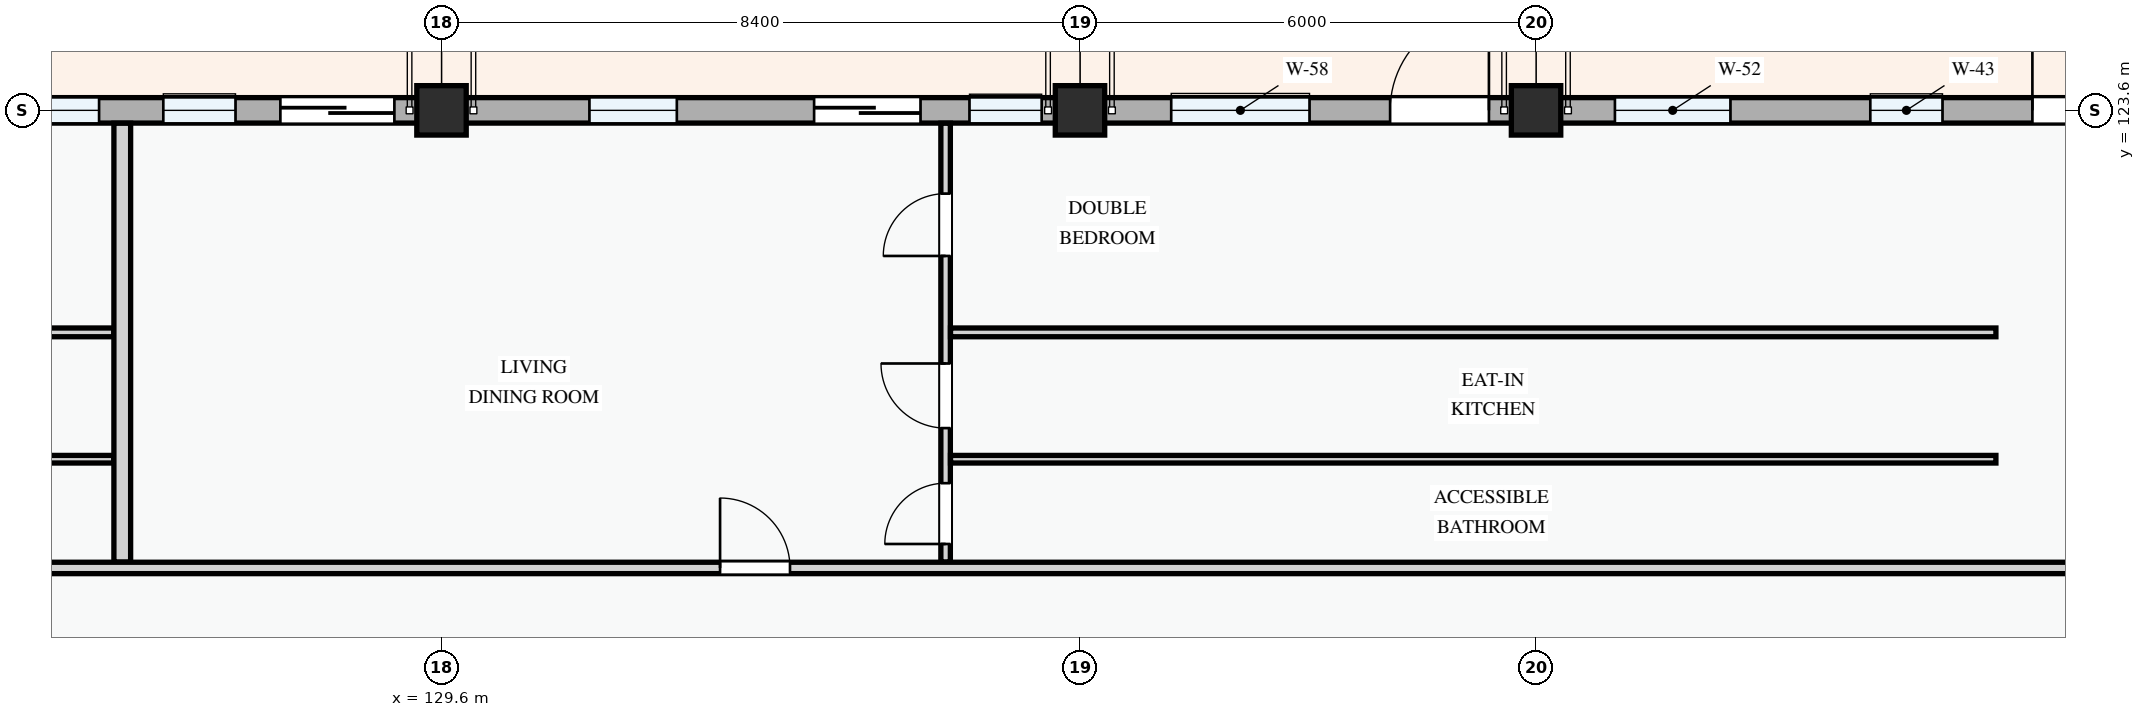
"""IFC4 building model, lengths in metres.
Left out: names, types, materials, properties, quantities, classifications, styles, units other than length and angle.
Written with IfcOpenShell. Run it as: python <this file> out.ifc"""

import sys

from ifc_helpers import new_model, si_unit, direction, frame, frame_2d, origin, origin_2d, place, context, subcontext, project, spatial, rectangle, extrude, element, fill, save


model = new_model("IFC4")
c1 = context("Model", 3, precision=1e-05, world=origin(), true_north=direction((0.0, 1.0)))
c2 = subcontext(c1, "Body", "Model", "MODEL_VIEW")
j1 = project(units=[si_unit("LENGTHUNIT", "METRE"), si_unit("PLANEANGLEUNIT", "RADIAN")], contexts=[c1])
p1 = place(None, origin())
s1 = spatial("IfcSite", under=j1, at=p1, CompositionType="ELEMENT")
p2 = place(p1, origin())
s2 = spatial("IfcBuilding", under=s1, at=p2, CompositionType="ELEMENT")
p3 = place(p2, frame((0.0, 0.0, 14.7)))
s3 = spatial("IfcBuildingStorey", under=s2, at=p3, CompositionType="ELEMENT", Elevation=14.7)
for number, where, z_axis, x_axis in (
    (1, (129.6, 123.6, 0.0), (0.0, 0.0, 1.0), (1.0, 0.0, 0.0)),
    (2, (138.0, 123.6, 0.0), (0.0, 0.0, 1.0), (1.0, 0.0, 0.0)),
    (3, (144.0, 123.6, 0.0), (0.0, 0.0, 1.0), (1.0, 0.0, 0.0)),
):
    element("IfcColumn", number, at=place(p3, frame(where, z_axis=z_axis, x_axis=x_axis)), inside=s3, PredefinedType="COLUMN", context=c2, shape_type="SweptSolid", body=[
        extrude(rectangle(XDim=0.65, YDim=0.65, at=origin_2d()), origin(), (0.0, 0.0, 1.0), 3.3),
    ])
p4 = place(p3, frame((152.4, 123.6, 0.0), z_axis=(0.0, 0.0, 1.0), x_axis=(-1.0, 0.0, 0.0)))
e4 = element("IfcWall", 4, at=p4, inside=s3, PredefinedType="STANDARD", context=c2, shape_type="SweptSolid", body=[
    extrude(rectangle(XDim=8.4, YDim=0.335, at=frame_2d((4.2, 0.0))), origin(), (0.0, 0.0, 1.0), 2.345),
])
p5 = place(p4, frame((0.62, 0.0, 0.0)))
e5 = element("IfcOpeningElement", 5, at=p5, cuts=e4, PredefinedType="OPENING", context=c2, shape_type="SweptSolid", body=[
    extrude(rectangle(XDim=1.25, YDim=2.2, at=frame_2d((0.625, 1.1))), frame((0.0, 0.177, 0.0), z_axis=(0.0, -1.0, 0.0), x_axis=(1.0, 0.0, 0.0)), (0.0, 0.0, 1.0), 0.355),
])
p6 = place(p4, frame((3.052, 0.0, 0.78)))
e6 = element("IfcOpeningElement", 6, at=p6, cuts=e4, PredefinedType="OPENING", context=c2, shape_type="SweptSolid", body=[
    extrude(rectangle(XDim=0.95, YDim=1.15, at=frame_2d((0.475, 0.575))), frame((0.0, 0.177, 0.0), z_axis=(0.0, -1.0, 0.0), x_axis=(1.0, 0.0, 0.0)), (0.0, 0.0, 1.0), 0.355),
])
p7 = place(p4, frame((5.843, 0.0, 0.78)))
e7 = element("IfcOpeningElement", 7, at=p7, cuts=e4, PredefinedType="OPENING", context=c2, shape_type="SweptSolid", body=[
    extrude(rectangle(XDim=1.52, YDim=1.42, at=frame_2d((0.76, 0.71))), frame((0.0, 0.177, 0.0), z_axis=(0.0, -1.0, 0.0), x_axis=(1.0, 0.0, 0.0)), (0.0, 0.0, 1.0), 0.355),
])
p8 = place(p3, frame((144.0, 123.6, 0.0), z_axis=(0.0, 0.0, 1.0), x_axis=(-1.0, 0.0, 0.0)))
e8 = element("IfcWall", 8, at=p8, inside=s3, PredefinedType="STANDARD", context=c2, shape_type="SweptSolid", body=[
    extrude(rectangle(XDim=6.0, YDim=0.335, at=frame_2d((3.0, 0.0))), origin(), (0.0, 0.0, 1.0), 2.445),
])
p9 = place(p8, frame((0.62, 0.0, 0.0)))
e9 = element("IfcOpeningElement", 9, at=p9, cuts=e8, PredefinedType="OPENING", context=c2, shape_type="SweptSolid", body=[
    extrude(rectangle(XDim=1.3, YDim=2.15, at=frame_2d((0.65, 1.075))), frame((0.0, 0.177, 0.0), z_axis=(0.0, -1.0, 0.0), x_axis=(1.0, 0.0, 0.0)), (0.0, 0.0, 1.0), 0.355),
])
p10 = place(p8, frame((2.98, 0.0, 0.78)))
e10 = element("IfcOpeningElement", 10, at=p10, cuts=e8, PredefinedType="OPENING", context=c2, shape_type="SweptSolid", body=[
    extrude(rectangle(XDim=1.82, YDim=1.46, at=frame_2d((0.91, 0.73))), frame((0.0, 0.177, 0.0), z_axis=(0.0, -1.0, 0.0), x_axis=(1.0, 0.0, 0.0)), (0.0, 0.0, 1.0), 0.355),
])
p11 = place(p3, frame((138.0, 123.6, 0.0), z_axis=(0.0, 0.0, 1.0), x_axis=(-1.0, 0.0, 0.0)))
e11 = element("IfcWall", 11, at=p11, inside=s3, PredefinedType="STANDARD", context=c2, shape_type="SweptSolid", body=[
    extrude(rectangle(XDim=8.4, YDim=0.335, at=frame_2d((4.2, 0.0))), origin(), (0.0, 0.0, 1.0), 2.345),
])
p12 = place(p11, frame((2.098, 0.0, 0.0)))
e12 = element("IfcOpeningElement", 12, at=p12, cuts=e11, PredefinedType="OPENING", context=c2, shape_type="SweptSolid", body=[
    extrude(rectangle(XDim=1.4, YDim=2.2, at=frame_2d((0.7, 1.1))), frame((0.0, 0.177, 0.0), z_axis=(0.0, -1.0, 0.0), x_axis=(1.0, 0.0, 0.0)), (0.0, 0.0, 1.0), 0.355),
])
p13 = place(p11, frame((0.504, 0.0, 0.78)))
e13 = element("IfcOpeningElement", 13, at=p13, cuts=e11, PredefinedType="OPENING", context=c2, shape_type="SweptSolid", body=[
    extrude(rectangle(XDim=0.95, YDim=1.15, at=frame_2d((0.475, 0.575))), frame((0.0, 0.177, 0.0), z_axis=(0.0, -1.0, 0.0), x_axis=(1.0, 0.0, 0.0)), (0.0, 0.0, 1.0), 0.355),
])
p14 = place(p11, frame((5.304, 0.0, 0.78)))
e14 = element("IfcOpeningElement", 14, at=p14, cuts=e11, PredefinedType="OPENING", context=c2, shape_type="SweptSolid", body=[
    extrude(rectangle(XDim=1.15, YDim=1.25, at=frame_2d((0.575, 0.625))), frame((0.0, 0.177, 0.0), z_axis=(0.0, -1.0, 0.0), x_axis=(1.0, 0.0, 0.0)), (0.0, 0.0, 1.0), 0.355),
])
p15 = place(p3, frame((129.6, 123.6, 0.0), z_axis=(0.0, 0.0, 1.0), x_axis=(-1.0, 0.0, 0.0)))
e15 = element("IfcWall", 15, at=p15, inside=s3, PredefinedType="STANDARD", context=c2, shape_type="SweptSolid", body=[
    extrude(rectangle(XDim=6.0, YDim=0.335, at=frame_2d((3.0, 0.0))), origin(), (0.0, 0.0, 1.0), 2.445),
])
p16 = place(p15, frame((0.62, 0.0, 0.0)))
e16 = element("IfcOpeningElement", 16, at=p16, cuts=e15, PredefinedType="OPENING", context=c2, shape_type="SweptSolid", body=[
    extrude(rectangle(XDim=1.5, YDim=2.2, at=frame_2d((0.75, 1.1))), frame((0.0, 0.177, 0.0), z_axis=(0.0, -1.0, 0.0), x_axis=(1.0, 0.0, 0.0)), (0.0, 0.0, 1.0), 0.355),
])
p17 = place(p15, frame((2.71, 0.0, 0.78)))
e17 = element("IfcOpeningElement", 17, at=p17, cuts=e15, PredefinedType="OPENING", context=c2, shape_type="SweptSolid", body=[
    extrude(rectangle(XDim=0.95, YDim=1.15, at=frame_2d((0.475, 0.575))), frame((0.0, 0.177, 0.0), z_axis=(0.0, -1.0, 0.0), x_axis=(1.0, 0.0, 0.0)), (0.0, 0.0, 1.0), 0.355),
])
p18 = place(p15, frame((4.505, 0.0, 0.78)))
e18 = element("IfcOpeningElement", 18, at=p18, cuts=e15, PredefinedType="OPENING", context=c2, shape_type="SweptSolid", body=[
    extrude(rectangle(XDim=1.0, YDim=1.25, at=frame_2d((0.5, 0.625))), frame((0.0, 0.177, 0.0), z_axis=(0.0, -1.0, 0.0), x_axis=(1.0, 0.0, 0.0)), (0.0, 0.0, 1.0), 0.355),
])
p19 = place(p3, frame((113.477, 120.679, 0.0), z_axis=(0.0, 0.0, 1.0), x_axis=(1.0, 0.0, 0.0)))
e19 = element("IfcWall", 19, at=p19, inside=s3, PredefinedType="PARTITIONING", context=c2, shape_type="SweptSolid", body=[
    extrude(rectangle(XDim=11.811, YDim=0.115, at=frame_2d((5.905, 0.0))), origin(), (0.0, 0.0, 1.0), 3.0),
])
p20 = place(p3, frame((113.477, 119.01, 0.0), z_axis=(0.0, 0.0, 1.0), x_axis=(1.0, 0.0, 0.0)))
e20 = element("IfcWall", 20, at=p20, inside=s3, PredefinedType="PARTITIONING", context=c2, shape_type="SweptSolid", body=[
    extrude(rectangle(XDim=11.811, YDim=0.1, at=frame_2d((5.905, 0.0))), origin(), (0.0, 0.0, 1.0), 3.0),
])
p21 = place(p3, frame((136.232, 117.657, 0.0), z_axis=(0.0, 0.0, 1.0), x_axis=(0.0, 1.0, 0.0)))
e21 = element("IfcWall", 21, at=p21, inside=s3, PredefinedType="PARTITIONING", context=c2, shape_type="SweptSolid", body=[
    extrude(rectangle(XDim=5.773, YDim=0.125, at=frame_2d((2.887, 0.0))), origin(), (0.0, 0.0, 1.0), 3.0),
])
p22 = place(p21, frame((0.238, 0.0, 0.0)))
e22 = element("IfcOpeningElement", 22, at=p22, cuts=e21, PredefinedType="OPENING", context=c2, shape_type="SweptSolid", body=[
    extrude(rectangle(XDim=0.8, YDim=2.1, at=frame_2d((0.4, 1.05))), frame((0.0, 0.073, 0.0), z_axis=(0.0, -1.0, 0.0), x_axis=(1.0, 0.0, 0.0)), (0.0, 0.0, 1.0), 0.145),
])
p23 = place(p21, frame((1.763, 0.0, 0.0)))
e23 = element("IfcOpeningElement", 23, at=p23, cuts=e21, PredefinedType="OPENING", context=c2, shape_type="SweptSolid", body=[
    extrude(rectangle(XDim=0.85, YDim=2.1, at=frame_2d((0.425, 1.05))), frame((0.0, 0.073, 0.0), z_axis=(0.0, -1.0, 0.0), x_axis=(1.0, 0.0, 0.0)), (0.0, 0.0, 1.0), 0.145),
])
p24 = place(p21, frame((4.028, 0.0, 0.0)))
e24 = element("IfcOpeningElement", 24, at=p24, cuts=e21, PredefinedType="OPENING", context=c2, shape_type="SweptSolid", body=[
    extrude(rectangle(XDim=0.82, YDim=2.08, at=frame_2d((0.41, 1.04))), frame((0.0, 0.073, 0.0), z_axis=(0.0, -1.0, 0.0), x_axis=(1.0, 0.0, 0.0)), (0.0, 0.0, 1.0), 0.145),
])
p25 = place(p3, frame((136.296, 120.679, 0.0), z_axis=(0.0, 0.0, 1.0), x_axis=(1.0, 0.0, 0.0)))
e25 = element("IfcWall", 25, at=p25, inside=s3, PredefinedType="PARTITIONING", context=c2, shape_type="SweptSolid", body=[
    extrude(rectangle(XDim=13.754, YDim=0.115, at=frame_2d((6.877, 0.0))), origin(), (0.0, 0.0, 1.0), 3.0),
])
p26 = place(p3, frame((136.296, 119.01, 0.0), z_axis=(0.0, 0.0, 1.0), x_axis=(1.0, 0.0, 0.0)))
e26 = element("IfcWall", 26, at=p26, inside=s3, PredefinedType="PARTITIONING", context=c2, shape_type="SweptSolid", body=[
    extrude(rectangle(XDim=13.754, YDim=0.1, at=frame_2d((6.877, 0.0))), origin(), (0.0, 0.0, 1.0), 3.0),
])
p27 = place(p3, frame((125.4, 117.657, 0.0), z_axis=(0.0, 0.0, 1.0), x_axis=(0.0, 1.0, 0.0)))
e27 = element("IfcWall", 27, at=p27, inside=s3, PredefinedType="PARTITIONING", context=c2, shape_type="SweptSolid", body=[
    extrude(rectangle(XDim=5.773, YDim=0.22, at=frame_2d((2.887, 0.0))), origin(), (0.0, 0.0, 1.0), 3.0),
])
p28 = place(p3, frame((80.57, 117.58, 0.0), z_axis=(0.0, 0.0, 1.0), x_axis=(1.0, 0.0, 0.0)))
e28 = element("IfcWall", 28, at=p28, inside=s3, PredefinedType="PARTITIONING", context=c2, shape_type="SweptSolid", body=[
    extrude(rectangle(XDim=71.97, YDim=0.15, at=frame_2d((35.985, 0.0))), origin(), (0.0, 0.0, 1.0), 3.0),
])
p29 = place(p28, frame((9.279, 0.0, 0.0)))
e29 = element("IfcOpeningElement", 29, at=p29, cuts=e28, PredefinedType="OPENING", context=c2, shape_type="SweptSolid", body=[
    extrude(rectangle(XDim=0.92, YDim=2.1, at=frame_2d((0.46, 1.05))), frame((0.0, 0.085, 0.0), z_axis=(0.0, -1.0, 0.0), x_axis=(1.0, 0.0, 0.0)), (0.0, 0.0, 1.0), 0.17),
])
p30 = place(p28, frame((23.985, 0.0, 0.0)))
e30 = element("IfcOpeningElement", 30, at=p30, cuts=e28, PredefinedType="OPENING", context=c2, shape_type="SweptSolid", body=[
    extrude(rectangle(XDim=0.96, YDim=2.12, at=frame_2d((0.48, 1.06))), frame((0.0, 0.085, 0.0), z_axis=(0.0, -1.0, 0.0), x_axis=(1.0, 0.0, 0.0)), (0.0, 0.0, 1.0), 0.17),
])
p31 = place(p28, frame((52.695, 0.0, 0.0)))
e31 = element("IfcOpeningElement", 31, at=p31, cuts=e28, PredefinedType="OPENING", context=c2, shape_type="SweptSolid", body=[
    extrude(rectangle(XDim=0.92, YDim=2.1, at=frame_2d((0.46, 1.05))), frame((0.0, 0.085, 0.0), z_axis=(0.0, -1.0, 0.0), x_axis=(1.0, 0.0, 0.0)), (0.0, 0.0, 1.0), 0.17),
])
p32 = place(p5, frame((1.25, 0.0, 0.0), z_axis=(0.0, 0.0, 1.0), x_axis=(-1.0, 0.0, 0.0)))
e32 = element("IfcDoor", 32, at=p32, inside=s3, OperationType="SINGLE_SWING_LEFT", PredefinedType="DOOR", context=c2, shape_type="SweptSolid", body=[
    extrude(rectangle(XDim=1.25, YDim=2.2, at=frame_2d((0.625, 1.1))), frame((0.0, 0.025, 0.0), z_axis=(0.0, -1.0, 0.0), x_axis=(1.0, 0.0, 0.0)), (0.0, 0.0, 1.0), 0.05),
])
fill(e5, e32)
p33 = place(p6, origin())
e33 = element("IfcWindow", 33, at=p33, inside=s3, PartitioningType="SINGLE_PANEL", PredefinedType="WINDOW", context=c2, shape_type="SweptSolid", body=[
    extrude(rectangle(XDim=0.95, YDim=1.15, at=frame_2d((0.475, 0.575))), frame((0.0, 0.03, 0.0), z_axis=(0.0, -1.0, 0.0), x_axis=(1.0, 0.0, 0.0)), (0.0, 0.0, 1.0), 0.06),
])
fill(e6, e33)
p34 = place(p7, origin())
e34 = element("IfcWindow", 34, at=p34, inside=s3, PartitioningType="SINGLE_PANEL", PredefinedType="WINDOW", context=c2, shape_type="SweptSolid", body=[
    extrude(rectangle(XDim=1.52, YDim=1.42, at=frame_2d((0.76, 0.71))), frame((0.0, 0.03, 0.0), z_axis=(0.0, -1.0, 0.0), x_axis=(1.0, 0.0, 0.0)), (0.0, 0.0, 1.0), 0.06),
])
fill(e7, e34)
p35 = place(p9, frame((1.3, 0.0, 0.0), z_axis=(0.0, 0.0, 1.0), x_axis=(-1.0, 0.0, 0.0)))
e35 = element("IfcDoor", 35, at=p35, inside=s3, OperationType="SINGLE_SWING_RIGHT", PredefinedType="DOOR", context=c2, shape_type="SweptSolid", body=[
    extrude(rectangle(XDim=1.3, YDim=2.15, at=frame_2d((0.65, 1.075))), frame((0.0, 0.025, 0.0), z_axis=(0.0, -1.0, 0.0), x_axis=(1.0, 0.0, 0.0)), (0.0, 0.0, 1.0), 0.05),
])
fill(e9, e35)
p36 = place(p10, origin())
e36 = element("IfcWindow", 36, at=p36, inside=s3, PartitioningType="DOUBLE_PANEL_VERTICAL", PredefinedType="WINDOW", context=c2, shape_type="SweptSolid", body=[
    extrude(rectangle(XDim=1.82, YDim=1.46, at=frame_2d((0.91, 0.73))), frame((0.0, 0.03, 0.0), z_axis=(0.0, -1.0, 0.0), x_axis=(1.0, 0.0, 0.0)), (0.0, 0.0, 1.0), 0.06),
])
fill(e10, e36)
p37 = place(p12, frame((1.4, 0.0, 0.0), z_axis=(0.0, 0.0, 1.0), x_axis=(-1.0, 0.0, 0.0)))
e37 = element("IfcDoor", 37, at=p37, inside=s3, OperationType="SLIDING_TO_LEFT", PredefinedType="DOOR", context=c2, shape_type="SweptSolid", body=[
    extrude(rectangle(XDim=1.4, YDim=2.2, at=frame_2d((0.7, 1.1))), frame((0.0, 0.025, 0.0), z_axis=(0.0, -1.0, 0.0), x_axis=(1.0, 0.0, 0.0)), (0.0, 0.0, 1.0), 0.05),
])
fill(e12, e37)
p38 = place(p13, origin())
e38 = element("IfcWindow", 38, at=p38, inside=s3, PartitioningType="SINGLE_PANEL", PredefinedType="WINDOW", context=c2, shape_type="SweptSolid", body=[
    extrude(rectangle(XDim=0.95, YDim=1.15, at=frame_2d((0.475, 0.575))), frame((0.0, 0.03, 0.0), z_axis=(0.0, -1.0, 0.0), x_axis=(1.0, 0.0, 0.0)), (0.0, 0.0, 1.0), 0.06),
])
fill(e13, e38)
p39 = place(p14, origin())
e39 = element("IfcWindow", 39, at=p39, inside=s3, PartitioningType="SINGLE_PANEL", PredefinedType="WINDOW", context=c2, shape_type="SweptSolid", body=[
    extrude(rectangle(XDim=1.15, YDim=1.25, at=frame_2d((0.575, 0.625))), frame((0.0, 0.03, 0.0), z_axis=(0.0, -1.0, 0.0), x_axis=(1.0, 0.0, 0.0)), (0.0, 0.0, 1.0), 0.06),
])
fill(e14, e39)
p40 = place(p16, frame((1.5, 0.0, 0.0), z_axis=(0.0, 0.0, 1.0), x_axis=(-1.0, 0.0, 0.0)))
e40 = element("IfcDoor", 40, at=p40, inside=s3, OperationType="SLIDING_TO_RIGHT", PredefinedType="DOOR", context=c2, shape_type="SweptSolid", body=[
    extrude(rectangle(XDim=1.5, YDim=2.2, at=frame_2d((0.75, 1.1))), frame((0.0, 0.025, 0.0), z_axis=(0.0, -1.0, 0.0), x_axis=(1.0, 0.0, 0.0)), (0.0, 0.0, 1.0), 0.05),
])
fill(e16, e40)
p41 = place(p17, origin())
e41 = element("IfcWindow", 41, at=p41, inside=s3, PartitioningType="SINGLE_PANEL", PredefinedType="WINDOW", context=c2, shape_type="SweptSolid", body=[
    extrude(rectangle(XDim=0.95, YDim=1.15, at=frame_2d((0.475, 0.575))), frame((0.0, 0.03, 0.0), z_axis=(0.0, -1.0, 0.0), x_axis=(1.0, 0.0, 0.0)), (0.0, 0.0, 1.0), 0.06),
])
fill(e17, e41)
p42 = place(p18, origin())
e42 = element("IfcWindow", 42, at=p42, inside=s3, PartitioningType="SINGLE_PANEL", PredefinedType="WINDOW", context=c2, shape_type="SweptSolid", body=[
    extrude(rectangle(XDim=1.0, YDim=1.25, at=frame_2d((0.5, 0.625))), frame((0.0, 0.03, 0.0), z_axis=(0.0, -1.0, 0.0), x_axis=(1.0, 0.0, 0.0)), (0.0, 0.0, 1.0), 0.06),
])
fill(e18, e42)
p43 = place(p22, origin())
e43 = element("IfcDoor", 43, at=p43, inside=s3, OperationType="SINGLE_SWING_LEFT", PredefinedType="DOOR", context=c2, shape_type="SweptSolid", body=[
    extrude(rectangle(XDim=0.8, YDim=2.1, at=frame_2d((0.4, 1.05))), frame((0.0, 0.025, 0.0), z_axis=(0.0, -1.0, 0.0), x_axis=(1.0, 0.0, 0.0)), (0.0, 0.0, 1.0), 0.05),
])
fill(e22, e43)
p44 = place(p23, origin())
e44 = element("IfcDoor", 44, at=p44, inside=s3, OperationType="SINGLE_SWING_RIGHT", PredefinedType="DOOR", context=c2, shape_type="SweptSolid", body=[
    extrude(rectangle(XDim=0.85, YDim=2.1, at=frame_2d((0.425, 1.05))), frame((0.0, 0.025, 0.0), z_axis=(0.0, -1.0, 0.0), x_axis=(1.0, 0.0, 0.0)), (0.0, 0.0, 1.0), 0.05),
])
fill(e23, e44)
p45 = place(p24, origin())
e45 = element("IfcDoor", 45, at=p45, inside=s3, OperationType="SINGLE_SWING_LEFT", PredefinedType="DOOR", context=c2, shape_type="SweptSolid", body=[
    extrude(rectangle(XDim=0.82, YDim=2.08, at=frame_2d((0.41, 1.04))), frame((0.0, 0.025, 0.0), z_axis=(0.0, -1.0, 0.0), x_axis=(1.0, 0.0, 0.0)), (0.0, 0.0, 1.0), 0.05),
])
fill(e24, e45)
p46 = place(p31, origin())
e46 = element("IfcDoor", 46, at=p46, inside=s3, OperationType="SINGLE_SWING_LEFT", PredefinedType="DOOR", context=c2, shape_type="SweptSolid", body=[
    extrude(rectangle(XDim=0.92, YDim=2.1, at=frame_2d((0.46, 1.05))), frame((0.0, 0.025, 0.0), z_axis=(0.0, -1.0, 0.0), x_axis=(1.0, 0.0, 0.0)), (0.0, 0.0, 1.0), 0.05),
])
fill(e31, e46)
save(model, sys.argv[1])
